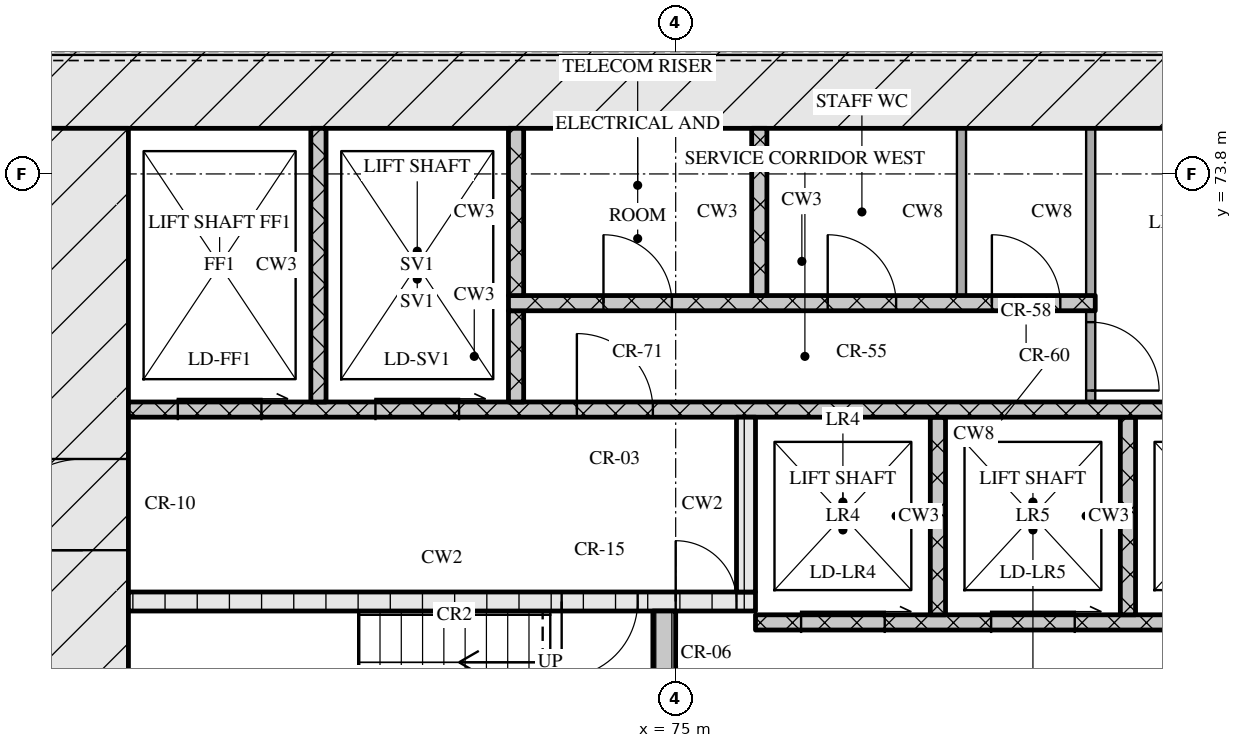
"""IFC4 building model, lengths in metres.
Left out: names, types, materials, properties, quantities, classifications, styles, units other than length and angle.
Written with IfcOpenShell. Run it as: python <this file> out.ifc"""

import sys

from ifc_helpers import new_model, si_unit, direction, frame, frame_2d, origin, place, context, subcontext, project, spatial, rectangle, extrude, element, fill, save


model = new_model("IFC4")
c1 = context("Model", 3, precision=1e-05, world=origin(), true_north=direction((0.0, 1.0)))
c2 = subcontext(c1, "Body", "Model", "MODEL_VIEW")
j1 = project(units=[si_unit("LENGTHUNIT", "METRE"), si_unit("PLANEANGLEUNIT", "RADIAN")], contexts=[c1])
p1 = place(None, origin())
s1 = spatial("IfcSite", under=j1, at=p1, CompositionType="ELEMENT")
p2 = place(p1, origin())
s2 = spatial("IfcBuilding", under=s1, at=p2, CompositionType="ELEMENT")
p3 = place(p2, frame((0.0, 0.0, 66.0)))
s3 = spatial("IfcBuildingStorey", under=s2, at=p3, CompositionType="ELEMENT", Elevation=66.0)
p4 = place(p3, frame((66.6, 75.0, 0.0), z_axis=(0.0, 0.0, 1.0), x_axis=(1.0, 0.0, 0.0)))
e1 = element("IfcWall", 1, at=p4, inside=s3, PredefinedType="SOLIDWALL", context=c2, shape_type="SweptSolid", body=[
    extrude(rectangle(XDim=42.0, YDim=1.2, at=frame_2d((21.0, 0.0))), origin(), (0.0, 0.0, 1.0), 3.32),
])
p5 = place(p3, frame((67.2, 62.4, 0.0), z_axis=(0.0, 0.0, 1.0), x_axis=(0.0, 1.0, 0.0)))
e2 = element("IfcWall", 2, at=p5, inside=s3, PredefinedType="SOLIDWALL", context=c2, shape_type="SweptSolid", body=[
    extrude(rectangle(XDim=12.0, YDim=1.2, at=frame_2d((6.0, 0.0))), origin(), (0.0, 0.0, 1.0), 3.32),
])
p6 = place(p5, frame((6.45, 0.0, 0.0)))
e3 = element("IfcOpeningElement", 3, at=p6, cuts=e2, PredefinedType="OPENING", context=c2, shape_type="SweptSolid", body=[
    extrude(rectangle(XDim=1.2, YDim=2.1, at=frame_2d((0.6, 1.05))), frame((0.0, 0.61, 0.0), z_axis=(0.0, -1.0, 0.0), x_axis=(1.0, 0.0, 0.0)), (0.0, 0.0, 1.0), 1.22),
])
p7 = place(p3, frame((74.85, 65.2, 0.0), z_axis=(0.0, 0.0, 1.0), x_axis=(0.0, 1.0, 0.0)))
e4 = element("IfcWall", 4, at=p7, inside=s3, PredefinedType="SOLIDWALL", context=c2, shape_type="SweptSolid", body=[
    extrude(rectangle(XDim=2.85, YDim=0.3, at=frame_2d((1.425, 0.0))), origin(), (0.0, 0.0, 1.0), 3.32),
])
p8 = place(p3, frame((76.05, 67.9, 0.0), z_axis=(0.0, 0.0, 1.0), x_axis=(1.0, 0.0, 0.0)))
e5 = element("IfcWall", 5, at=p8, inside=s3, PredefinedType="SOLIDWALL", context=c2, shape_type="SweptSolid", body=[
    extrude(rectangle(XDim=23.1, YDim=0.2, at=frame_2d((11.55, 0.0))), origin(), (0.0, 0.0, 1.0), 3.32),
])
p9 = place(p8, frame((0.6, 0.0, 0.0)))
e6 = element("IfcOpeningElement", 6, at=p9, cuts=e5, PredefinedType="OPENING", context=c2, shape_type="SweptSolid", body=[
    extrude(rectangle(XDim=1.1, YDim=2.1, at=frame_2d((0.55, 1.05))), frame((0.0, 0.11, 0.0), z_axis=(0.0, -1.0, 0.0), x_axis=(1.0, 0.0, 0.0)), (0.0, 0.0, 1.0), 0.22),
])
p10 = place(p8, frame((3.1, 0.0, 0.0)))
e7 = element("IfcOpeningElement", 7, at=p10, cuts=e5, PredefinedType="OPENING", context=c2, shape_type="SweptSolid", body=[
    extrude(rectangle(XDim=1.1, YDim=2.1, at=frame_2d((0.55, 1.05))), frame((0.0, 0.11, 0.0), z_axis=(0.0, -1.0, 0.0), x_axis=(1.0, 0.0, 0.0)), (0.0, 0.0, 1.0), 0.22),
])
p11 = place(p8, frame((5.6, 0.0, 0.0)))
e8 = element("IfcOpeningElement", 8, at=p11, cuts=e5, PredefinedType="OPENING", context=c2, shape_type="SweptSolid", body=[
    extrude(rectangle(XDim=1.1, YDim=2.1, at=frame_2d((0.55, 1.05))), frame((0.0, 0.11, 0.0), z_axis=(0.0, -1.0, 0.0), x_axis=(1.0, 0.0, 0.0)), (0.0, 0.0, 1.0), 0.22),
])
p12 = place(p8, frame((8.45, 0.0, 0.0)))
e9 = element("IfcOpeningElement", 9, at=p12, cuts=e5, PredefinedType="OPENING", context=c2, shape_type="SweptSolid", body=[
    extrude(rectangle(XDim=0.9, YDim=2.1, at=frame_2d((0.45, 1.05))), frame((0.0, 0.11, 0.0), z_axis=(0.0, -1.0, 0.0), x_axis=(1.0, 0.0, 0.0)), (0.0, 0.0, 1.0), 0.22),
])
p13 = place(p8, frame((10.91, 0.0, 0.0)))
e10 = element("IfcOpeningElement", 10, at=p13, cuts=e5, PredefinedType="OPENING", context=c2, shape_type="SweptSolid", body=[
    extrude(rectangle(XDim=0.9, YDim=2.1, at=frame_2d((0.45, 1.05))), frame((0.0, 0.11, 0.0), z_axis=(0.0, -1.0, 0.0), x_axis=(1.0, 0.0, 0.0)), (0.0, 0.0, 1.0), 0.22),
])
p14 = place(p8, frame((13.55, 0.0, 0.0)))
e11 = element("IfcOpeningElement", 11, at=p14, cuts=e5, PredefinedType="OPENING", context=c2, shape_type="SweptSolid", body=[
    extrude(rectangle(XDim=1.0, YDim=2.1, at=frame_2d((0.5, 1.05))), frame((0.0, 0.11, 0.0), z_axis=(0.0, -1.0, 0.0), x_axis=(1.0, 0.0, 0.0)), (0.0, 0.0, 1.0), 0.22),
])
for number, where, z_axis, x_axis in (
    (12, (78.45, 68.0, 0.0), (0.0, 0.0, 1.0), (0.0, 1.0, 0.0)),
    (13, (80.95, 68.0, 0.0), (0.0, 0.0, 1.0), (0.0, 1.0, 0.0)),
):
    element("IfcWall", number, at=place(p3, frame(where, z_axis=z_axis, x_axis=x_axis)), inside=s3, PredefinedType="SOLIDWALL", context=c2, shape_type="SweptSolid", body=[
        extrude(rectangle(XDim=2.6, YDim=0.2, at=frame_2d((1.3, 0.0))), origin(), (0.0, 0.0, 1.0), 3.32),
    ])
p15 = place(p3, frame((67.8, 68.175, 0.0), z_axis=(0.0, 0.0, 1.0), x_axis=(1.0, 0.0, 0.0)))
e14 = element("IfcWall", 14, at=p15, inside=s3, PredefinedType="SOLIDWALL", context=c2, shape_type="SweptSolid", body=[
    extrude(rectangle(XDim=8.25, YDim=0.25, at=frame_2d((4.125, 0.0))), origin(), (0.0, 0.0, 1.0), 3.32),
])
p16 = place(p15, frame((5.7, 0.0, 0.0)))
e15 = element("IfcOpeningElement", 15, at=p16, cuts=e14, PredefinedType="OPENING", context=c2, shape_type="SweptSolid", body=[
    extrude(rectangle(XDim=1.0, YDim=2.1, at=frame_2d((0.5, 1.05))), frame((0.0, 0.135, 0.0), z_axis=(0.0, -1.0, 0.0), x_axis=(1.0, 0.0, 0.0)), (0.0, 0.0, 1.0), 0.27),
])
p17 = place(p15, frame((7.2, 0.0, 0.0)))
e16 = element("IfcOpeningElement", 16, at=p17, cuts=e14, PredefinedType="OPENING", context=c2, shape_type="SweptSolid", body=[
    extrude(rectangle(XDim=0.8, YDim=2.1, at=frame_2d((0.4, 1.05))), frame((0.0, 0.135, 0.0), z_axis=(0.0, -1.0, 0.0), x_axis=(1.0, 0.0, 0.0)), (0.0, 0.0, 1.0), 0.27),
])
p18 = place(p3, frame((75.925, 68.3, 0.0), z_axis=(0.0, 0.0, 1.0), x_axis=(0.0, 1.0, 0.0)))
e17 = element("IfcWall", 17, at=p18, inside=s3, PredefinedType="SOLIDWALL", context=c2, shape_type="SweptSolid", body=[
    extrude(rectangle(XDim=2.3, YDim=0.25, at=frame_2d((1.15, 0.0))), origin(), (0.0, 0.0, 1.0), 3.32),
])
p19 = place(p3, frame((67.8, 70.7, 0.0), z_axis=(0.0, 0.0, 1.0), x_axis=(1.0, 0.0, 0.0)))
e18 = element("IfcWall", 18, at=p19, inside=s3, PredefinedType="SOLIDWALL", context=c2, shape_type="SweptSolid", body=[
    extrude(rectangle(XDim=39.6, YDim=0.2, at=frame_2d((19.8, 0.0))), origin(), (0.0, 0.0, 1.0), 3.32),
])
p20 = place(p19, frame((0.65, 0.0, 0.0)))
e19 = element("IfcOpeningElement", 19, at=p20, cuts=e18, PredefinedType="OPENING", context=c2, shape_type="SweptSolid", body=[
    extrude(rectangle(XDim=1.1, YDim=2.1, at=frame_2d((0.55, 1.05))), frame((0.0, 0.11, 0.0), z_axis=(0.0, -1.0, 0.0), x_axis=(1.0, 0.0, 0.0)), (0.0, 0.0, 1.0), 0.22),
])
p21 = place(p19, frame((3.25, 0.0, 0.0)))
e20 = element("IfcOpeningElement", 20, at=p21, cuts=e18, PredefinedType="OPENING", context=c2, shape_type="SweptSolid", body=[
    extrude(rectangle(XDim=1.1, YDim=2.1, at=frame_2d((0.55, 1.05))), frame((0.0, 0.11, 0.0), z_axis=(0.0, -1.0, 0.0), x_axis=(1.0, 0.0, 0.0)), (0.0, 0.0, 1.0), 0.22),
])
p22 = place(p19, frame((5.9, 0.0, 0.0)))
e21 = element("IfcOpeningElement", 21, at=p22, cuts=e18, PredefinedType="OPENING", context=c2, shape_type="SweptSolid", body=[
    extrude(rectangle(XDim=1.0, YDim=2.1, at=frame_2d((0.5, 1.05))), frame((0.0, 0.11, 0.0), z_axis=(0.0, -1.0, 0.0), x_axis=(1.0, 0.0, 0.0)), (0.0, 0.0, 1.0), 0.22),
])
p23 = place(p19, frame((21.7, 0.0, 0.0)))
e22 = element("IfcOpeningElement", 22, at=p23, cuts=e18, PredefinedType="OPENING", context=c2, shape_type="SweptSolid", body=[
    extrude(rectangle(XDim=1.0, YDim=2.1, at=frame_2d((0.5, 1.05))), frame((0.0, 0.11, 0.0), z_axis=(0.0, -1.0, 0.0), x_axis=(1.0, 0.0, 0.0)), (0.0, 0.0, 1.0), 0.22),
])
p24 = place(p19, frame((32.7, 0.0, 0.0)))
e23 = element("IfcOpeningElement", 23, at=p24, cuts=e18, PredefinedType="OPENING", context=c2, shape_type="SweptSolid", body=[
    extrude(rectangle(XDim=1.0, YDim=2.1, at=frame_2d((0.5, 1.05))), frame((0.0, 0.11, 0.0), z_axis=(0.0, -1.0, 0.0), x_axis=(1.0, 0.0, 0.0)), (0.0, 0.0, 1.0), 0.22),
])
p25 = place(p19, frame((35.25, 0.0, 0.0)))
e24 = element("IfcOpeningElement", 24, at=p25, cuts=e18, PredefinedType="OPENING", context=c2, shape_type="SweptSolid", body=[
    extrude(rectangle(XDim=1.1, YDim=2.1, at=frame_2d((0.55, 1.05))), frame((0.0, 0.11, 0.0), z_axis=(0.0, -1.0, 0.0), x_axis=(1.0, 0.0, 0.0)), (0.0, 0.0, 1.0), 0.22),
])
p26 = place(p19, frame((37.85, 0.0, 0.0)))
e25 = element("IfcOpeningElement", 25, at=p26, cuts=e18, PredefinedType="OPENING", context=c2, shape_type="SweptSolid", body=[
    extrude(rectangle(XDim=1.1, YDim=2.1, at=frame_2d((0.55, 1.05))), frame((0.0, 0.11, 0.0), z_axis=(0.0, -1.0, 0.0), x_axis=(1.0, 0.0, 0.0)), (0.0, 0.0, 1.0), 0.22),
])
p27 = place(p3, frame((70.3, 70.8, 0.0), z_axis=(0.0, 0.0, 1.0), x_axis=(0.0, 1.0, 0.0)))
e26 = element("IfcWall", 26, at=p27, inside=s3, PredefinedType="SOLIDWALL", context=c2, shape_type="SweptSolid", body=[
    extrude(rectangle(XDim=3.6, YDim=0.2, at=frame_2d((1.8, 0.0))), origin(), (0.0, 0.0, 1.0), 3.32),
])
p28 = place(p3, frame((72.9, 70.8, 0.0), z_axis=(0.0, 0.0, 1.0), x_axis=(0.0, 1.0, 0.0)))
e27 = element("IfcWall", 27, at=p28, inside=s3, PredefinedType="SOLIDWALL", context=c2, shape_type="SweptSolid", body=[
    extrude(rectangle(XDim=1.2, YDim=0.2, at=frame_2d((0.6, 0.0))), origin(), (0.0, 0.0, 1.0), 3.32),
])
p29 = place(p3, frame((80.46, 70.8, 0.0), z_axis=(0.0, 0.0, 1.0), x_axis=(0.0, 1.0, 0.0)))
e28 = element("IfcWall", 28, at=p29, inside=s3, PredefinedType="PARTITIONING", context=c2, shape_type="SweptSolid", body=[
    extrude(rectangle(XDim=1.2, YDim=0.12, at=frame_2d((0.6, 0.0))), origin(), (0.0, 0.0, 1.0), 3.32),
])
p30 = place(p29, frame((0.15, 0.0, 0.0)))
e29 = element("IfcOpeningElement", 29, at=p30, cuts=e28, PredefinedType="OPENING", context=c2, shape_type="SweptSolid", body=[
    extrude(rectangle(XDim=0.9, YDim=2.1, at=frame_2d((0.45, 1.05))), frame((0.0, 0.07, 0.0), z_axis=(0.0, -1.0, 0.0), x_axis=(1.0, 0.0, 0.0)), (0.0, 0.0, 1.0), 0.14),
])
p31 = place(p3, frame((72.8, 72.1, 0.0), z_axis=(0.0, 0.0, 1.0), x_axis=(1.0, 0.0, 0.0)))
e30 = element("IfcWall", 30, at=p31, inside=s3, PredefinedType="SOLIDWALL", context=c2, shape_type="SweptSolid", body=[
    extrude(rectangle(XDim=7.72, YDim=0.2, at=frame_2d((3.86, 0.0))), origin(), (0.0, 0.0, 1.0), 3.32),
])
p32 = place(p31, frame((1.25, 0.0, 0.0)))
e31 = element("IfcOpeningElement", 31, at=p32, cuts=e30, PredefinedType="OPENING", context=c2, shape_type="SweptSolid", body=[
    extrude(rectangle(XDim=0.9, YDim=2.1, at=frame_2d((0.45, 1.05))), frame((0.0, 0.11, 0.0), z_axis=(0.0, -1.0, 0.0), x_axis=(1.0, 0.0, 0.0)), (0.0, 0.0, 1.0), 0.22),
])
p33 = place(p31, frame((4.2, 0.0, 0.0)))
e32 = element("IfcOpeningElement", 32, at=p33, cuts=e30, PredefinedType="OPENING", context=c2, shape_type="SweptSolid", body=[
    extrude(rectangle(XDim=0.9, YDim=2.1, at=frame_2d((0.45, 1.05))), frame((0.0, 0.11, 0.0), z_axis=(0.0, -1.0, 0.0), x_axis=(1.0, 0.0, 0.0)), (0.0, 0.0, 1.0), 0.22),
])
p34 = place(p31, frame((6.36, 0.0, 0.0)))
e33 = element("IfcOpeningElement", 33, at=p34, cuts=e30, PredefinedType="OPENING", context=c2, shape_type="SweptSolid", body=[
    extrude(rectangle(XDim=0.9, YDim=2.1, at=frame_2d((0.45, 1.05))), frame((0.0, 0.11, 0.0), z_axis=(0.0, -1.0, 0.0), x_axis=(1.0, 0.0, 0.0)), (0.0, 0.0, 1.0), 0.22),
])
for number, where, z_axis, x_axis in (
    (34, (72.9, 72.2, 0.0), (0.0, 0.0, 1.0), (0.0, 1.0, 0.0)),
    (35, (76.1, 72.2, 0.0), (0.0, 0.0, 1.0), (0.0, 1.0, 0.0)),
):
    element("IfcWall", number, at=place(p3, frame(where, z_axis=z_axis, x_axis=x_axis)), inside=s3, PredefinedType="SOLIDWALL", context=c2, shape_type="SweptSolid", body=[
        extrude(rectangle(XDim=2.2, YDim=0.2, at=frame_2d((1.1, 0.0))), origin(), (0.0, 0.0, 1.0), 3.32),
    ])
for number, where, z_axis, x_axis in (
    (36, (78.76, 72.2, 0.0), (0.0, 0.0, 1.0), (0.0, 1.0, 0.0)),
    (37, (80.46, 72.2, 0.0), (0.0, 0.0, 1.0), (0.0, 1.0, 0.0)),
):
    element("IfcWall", number, at=place(p3, frame(where, z_axis=z_axis, x_axis=x_axis)), inside=s3, PredefinedType="PARTITIONING", context=c2, shape_type="SweptSolid", body=[
        extrude(rectangle(XDim=2.2, YDim=0.12, at=frame_2d((1.1, 0.0))), origin(), (0.0, 0.0, 1.0), 3.32),
    ])
p35 = place(p9, origin())
e38 = element("IfcDoor", 38, at=p35, inside=s3, OperationType="SLIDING_TO_RIGHT", PredefinedType="DOOR", context=c2, shape_type="SweptSolid", body=[
    extrude(rectangle(XDim=1.1, YDim=2.1, at=frame_2d((0.55, 1.05))), frame((0.0, 0.025, 0.0), z_axis=(0.0, -1.0, 0.0), x_axis=(1.0, 0.0, 0.0)), (0.0, 0.0, 1.0), 0.05),
])
fill(e6, e38)
p36 = place(p10, origin())
e39 = element("IfcDoor", 39, at=p36, inside=s3, OperationType="SLIDING_TO_RIGHT", PredefinedType="DOOR", context=c2, shape_type="SweptSolid", body=[
    extrude(rectangle(XDim=1.1, YDim=2.1, at=frame_2d((0.55, 1.05))), frame((0.0, 0.025, 0.0), z_axis=(0.0, -1.0, 0.0), x_axis=(1.0, 0.0, 0.0)), (0.0, 0.0, 1.0), 0.05),
])
fill(e7, e39)
p37 = place(p16, origin())
e40 = element("IfcDoor", 40, at=p37, inside=s3, OperationType="SINGLE_SWING_RIGHT", PredefinedType="DOOR", context=c2, shape_type="SweptSolid", body=[
    extrude(rectangle(XDim=1.0, YDim=2.1, at=frame_2d((0.5, 1.05))), frame((0.0, 0.025, 0.0), z_axis=(0.0, -1.0, 0.0), x_axis=(1.0, 0.0, 0.0)), (0.0, 0.0, 1.0), 0.05),
])
fill(e15, e40)
p38 = place(p17, origin())
e41 = element("IfcDoor", 41, at=p38, inside=s3, OperationType="SINGLE_SWING_LEFT", PredefinedType="DOOR", context=c2, shape_type="SweptSolid", body=[
    extrude(rectangle(XDim=0.8, YDim=2.1, at=frame_2d((0.4, 1.05))), frame((0.0, 0.025, 0.0), z_axis=(0.0, -1.0, 0.0), x_axis=(1.0, 0.0, 0.0)), (0.0, 0.0, 1.0), 0.05),
])
fill(e16, e41)
p39 = place(p6, origin())
e42 = element("IfcDoor", 42, at=p39, inside=s3, OperationType="SINGLE_SWING_LEFT", PredefinedType="DOOR", context=c2, shape_type="SweptSolid", body=[
    extrude(rectangle(XDim=1.2, YDim=2.1, at=frame_2d((0.6, 1.05))), frame((0.0, 0.025, 0.0), z_axis=(0.0, -1.0, 0.0), x_axis=(1.0, 0.0, 0.0)), (0.0, 0.0, 1.0), 0.05),
])
fill(e3, e42)
p40 = place(p20, origin())
e43 = element("IfcDoor", 43, at=p40, inside=s3, OperationType="SLIDING_TO_RIGHT", PredefinedType="DOOR", context=c2, shape_type="SweptSolid", body=[
    extrude(rectangle(XDim=1.1, YDim=2.1, at=frame_2d((0.55, 1.05))), frame((0.0, 0.025, 0.0), z_axis=(0.0, -1.0, 0.0), x_axis=(1.0, 0.0, 0.0)), (0.0, 0.0, 1.0), 0.05),
])
fill(e19, e43)
p41 = place(p21, origin())
e44 = element("IfcDoor", 44, at=p41, inside=s3, OperationType="SLIDING_TO_RIGHT", PredefinedType="DOOR", context=c2, shape_type="SweptSolid", body=[
    extrude(rectangle(XDim=1.1, YDim=2.1, at=frame_2d((0.55, 1.05))), frame((0.0, 0.025, 0.0), z_axis=(0.0, -1.0, 0.0), x_axis=(1.0, 0.0, 0.0)), (0.0, 0.0, 1.0), 0.05),
])
fill(e20, e44)
p42 = place(p22, origin())
e45 = element("IfcDoor", 45, at=p42, inside=s3, OperationType="SINGLE_SWING_LEFT", PredefinedType="DOOR", context=c2, shape_type="SweptSolid", body=[
    extrude(rectangle(XDim=1.0, YDim=2.1, at=frame_2d((0.5, 1.05))), frame((0.0, 0.025, 0.0), z_axis=(0.0, -1.0, 0.0), x_axis=(1.0, 0.0, 0.0)), (0.0, 0.0, 1.0), 0.05),
])
fill(e21, e45)
p43 = place(p30, origin())
e46 = element("IfcDoor", 46, at=p43, inside=s3, OperationType="SINGLE_SWING_RIGHT", PredefinedType="DOOR", context=c2, shape_type="SweptSolid", body=[
    extrude(rectangle(XDim=0.9, YDim=2.1, at=frame_2d((0.45, 1.05))), frame((0.0, 0.025, 0.0), z_axis=(0.0, -1.0, 0.0), x_axis=(1.0, 0.0, 0.0)), (0.0, 0.0, 1.0), 0.05),
])
fill(e29, e46)
p44 = place(p32, origin())
e47 = element("IfcDoor", 47, at=p44, inside=s3, OperationType="SINGLE_SWING_LEFT", PredefinedType="DOOR", context=c2, shape_type="SweptSolid", body=[
    extrude(rectangle(XDim=0.9, YDim=2.1, at=frame_2d((0.45, 1.05))), frame((0.0, 0.025, 0.0), z_axis=(0.0, -1.0, 0.0), x_axis=(1.0, 0.0, 0.0)), (0.0, 0.0, 1.0), 0.05),
])
fill(e31, e47)
p45 = place(p33, origin())
e48 = element("IfcDoor", 48, at=p45, inside=s3, OperationType="SINGLE_SWING_LEFT", PredefinedType="DOOR", context=c2, shape_type="SweptSolid", body=[
    extrude(rectangle(XDim=0.9, YDim=2.1, at=frame_2d((0.45, 1.05))), frame((0.0, 0.025, 0.0), z_axis=(0.0, -1.0, 0.0), x_axis=(1.0, 0.0, 0.0)), (0.0, 0.0, 1.0), 0.05),
])
fill(e32, e48)
p46 = place(p34, origin())
e49 = element("IfcDoor", 49, at=p46, inside=s3, OperationType="SINGLE_SWING_LEFT", PredefinedType="DOOR", context=c2, shape_type="SweptSolid", body=[
    extrude(rectangle(XDim=0.9, YDim=2.1, at=frame_2d((0.45, 1.05))), frame((0.0, 0.025, 0.0), z_axis=(0.0, -1.0, 0.0), x_axis=(1.0, 0.0, 0.0)), (0.0, 0.0, 1.0), 0.05),
])
fill(e33, e49)
save(model, sys.argv[1])
